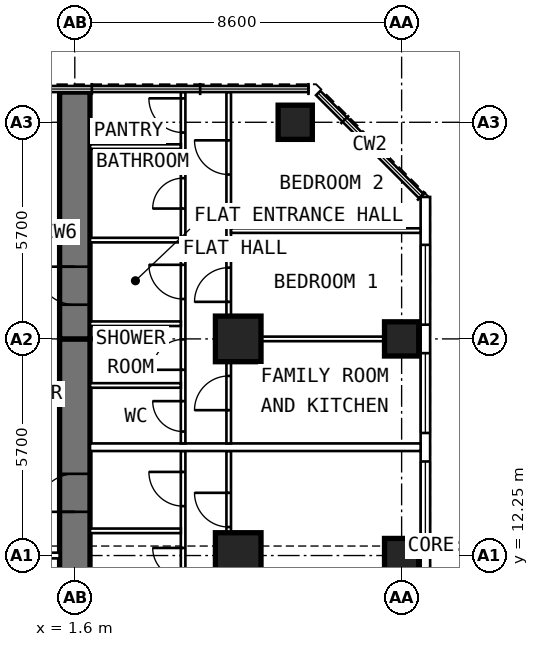
"""IFC4 building model, lengths in metres.
Left out: names, types, materials, properties, quantities, classifications, styles, units other than length and angle.
Written with IfcOpenShell. Run it as: python <this file> out.ifc"""

import sys

from ifc_helpers import new_model, si_unit, direction, frame, frame_2d, origin, origin_2d, place, context, subcontext, project, spatial, rectangle, extrude, element, fill, save


model = new_model("IFC4")
c1 = context("Model", 3, precision=1e-05, world=origin(), true_north=direction((0.0, 1.0)))
c2 = subcontext(c1, "Body", "Model", "MODEL_VIEW")
j1 = project(units=[si_unit("LENGTHUNIT", "METRE"), si_unit("PLANEANGLEUNIT", "RADIAN")], contexts=[c1])
p1 = place(None, origin())
s1 = spatial("IfcSite", under=j1, at=p1, CompositionType="ELEMENT")
p2 = place(p1, origin())
s2 = spatial("IfcBuilding", under=s1, at=p2, CompositionType="ELEMENT")
p3 = place(p2, frame((0.0, 0.0, 168.8)))
s3 = spatial("IfcBuildingStorey", under=s2, at=p3, CompositionType="ELEMENT", Elevation=168.8)
for number, where, z_axis, x_axis in (
    (1, (10.2, 12.25, 0.0), (0.0, 0.0, 1.0), (0.0, 1.0, 0.0)),
    (2, (10.2, 17.95, 0.0), (0.0, 0.0, 1.0), (0.0, 1.0, 0.0)),
    (3, (7.4, 23.65, 0.0), (0.0, 0.0, 1.0), (0.0, 1.0, 0.0)),
):
    element("IfcColumn", number, at=place(p3, frame(where, z_axis=z_axis, x_axis=x_axis)), inside=s3, PredefinedType="COLUMN", context=c2, shape_type="SweptSolid", body=[
        extrude(rectangle(XDim=0.9, YDim=0.9, at=origin_2d()), origin(), (0.0, 0.0, 1.0), 3.6),
    ])
for number, where, z_axis, x_axis in (
    (4, (5.9, 12.25, 0.0), (0.0, 0.0, 1.0), (0.0, 1.0, 0.0)),
    (5, (5.9, 17.95, 0.0), (0.0, 0.0, 1.0), (0.0, 1.0, 0.0)),
):
    element("IfcColumn", number, at=place(p3, frame(where, z_axis=z_axis, x_axis=x_axis)), inside=s3, PredefinedType="COLUMN", context=c2, shape_type="SweptSolid", body=[
        extrude(rectangle(XDim=1.2, YDim=1.2, at=origin_2d()), origin(), (0.0, 0.0, 1.0), 3.6),
    ])
p4 = place(p3, frame((1.6, 9.6, 0.0), z_axis=(0.0, 0.0, 1.0), x_axis=(0.0, 1.0, 0.0)))
e6 = element("IfcWall", 6, at=p4, inside=s3, PredefinedType="SHEAR", context=c2, shape_type="SweptSolid", body=[
    extrude(rectangle(XDim=8.35, YDim=0.8, at=frame_2d((4.175, 0.0))), origin(), (0.0, 0.0, 1.0), 3.6),
])
p5 = place(p4, frame((3.8, 0.0, 0.0)))
e7 = element("IfcOpeningElement", 7, at=p5, cuts=e6, PredefinedType="OPENING", context=c2, shape_type="SweptSolid", body=[
    extrude(rectangle(XDim=1.0, YDim=2.1, at=frame_2d((0.5, 1.05))), frame((0.0, 0.412, 0.0), z_axis=(0.0, -1.0, 0.0), x_axis=(1.0, 0.0, 0.0)), (0.0, 0.0, 1.0), 0.824),
])
p6 = place(p3, frame((1.6, 17.95, 0.0), z_axis=(0.0, 0.0, 1.0), x_axis=(0.0, 1.0, 0.0)))
e8 = element("IfcWall", 8, at=p6, inside=s3, PredefinedType="SHEAR", context=c2, shape_type="SweptSolid", body=[
    extrude(rectangle(XDim=6.495, YDim=0.8, at=frame_2d((3.248, 0.0))), origin(), (0.0, 0.0, 1.0), 3.6),
])
p7 = place(p6, frame((0.9, 0.0, 0.0)))
e9 = element("IfcOpeningElement", 9, at=p7, cuts=e8, PredefinedType="OPENING", context=c2, shape_type="SweptSolid", body=[
    extrude(rectangle(XDim=1.0, YDim=2.1, at=frame_2d((0.5, 1.05))), frame((0.0, 0.412, 0.0), z_axis=(0.0, -1.0, 0.0), x_axis=(1.0, 0.0, 0.0)), (0.0, 0.0, 1.0), 0.824),
])
p8 = place(p3, frame((10.825, 6.409, 0.0), z_axis=(0.0, 0.0, 1.0), x_axis=(0.0, 1.0, 0.0)))
e10 = element("IfcWall", 10, at=p8, inside=s3, PredefinedType="SOLIDWALL", context=c2, shape_type="SweptSolid", body=[
    extrude(rectangle(XDim=15.276, YDim=0.25, at=frame_2d((7.638, 0.0))), origin(), (0.0, 0.0, 1.0), 3.35),
])
p9 = place(p8, frame((0.516, 0.0, 0.8)))
e11 = element("IfcOpeningElement", 11, at=p9, cuts=e10, PredefinedType="OPENING", context=c2, shape_type="SweptSolid", body=[
    extrude(rectangle(XDim=2.1, YDim=1.8, at=frame_2d((1.05, 0.9))), frame((0.0, 0.137, 0.0), z_axis=(0.0, -1.0, 0.0), x_axis=(1.0, 0.0, 0.0)), (0.0, 0.0, 1.0), 0.274),
])
p10 = place(p8, frame((3.366, 0.0, 0.8)))
e12 = element("IfcOpeningElement", 12, at=p10, cuts=e10, PredefinedType="OPENING", context=c2, shape_type="SweptSolid", body=[
    extrude(rectangle(XDim=2.1, YDim=1.8, at=frame_2d((1.05, 0.9))), frame((0.0, 0.137, 0.0), z_axis=(0.0, -1.0, 0.0), x_axis=(1.0, 0.0, 0.0)), (0.0, 0.0, 1.0), 0.274),
])
p11 = place(p8, frame((6.216, 0.0, 0.8)))
e13 = element("IfcOpeningElement", 13, at=p11, cuts=e10, PredefinedType="OPENING", context=c2, shape_type="SweptSolid", body=[
    extrude(rectangle(XDim=2.1, YDim=1.8, at=frame_2d((1.05, 0.9))), frame((0.0, 0.137, 0.0), z_axis=(0.0, -1.0, 0.0), x_axis=(1.0, 0.0, 0.0)), (0.0, 0.0, 1.0), 0.274),
])
p12 = place(p8, frame((9.066, 0.0, 0.8)))
e14 = element("IfcOpeningElement", 14, at=p12, cuts=e10, PredefinedType="OPENING", context=c2, shape_type="SweptSolid", body=[
    extrude(rectangle(XDim=2.1, YDim=1.8, at=frame_2d((1.05, 0.9))), frame((0.0, 0.137, 0.0), z_axis=(0.0, -1.0, 0.0), x_axis=(1.0, 0.0, 0.0)), (0.0, 0.0, 1.0), 0.274),
])
p13 = place(p8, frame((11.916, 0.0, 0.8)))
e15 = element("IfcOpeningElement", 15, at=p13, cuts=e10, PredefinedType="OPENING", context=c2, shape_type="SweptSolid", body=[
    extrude(rectangle(XDim=2.1, YDim=1.8, at=frame_2d((1.05, 0.9))), frame((0.0, 0.137, 0.0), z_axis=(0.0, -1.0, 0.0), x_axis=(1.0, 0.0, 0.0)), (0.0, 0.0, 1.0), 0.274),
])
p14 = place(p3, frame((4.45, 10.05, 0.0), z_axis=(0.0, 0.0, 1.0), x_axis=(0.0, 1.0, 0.0)))
e16 = element("IfcWall", 16, at=p14, inside=s3, PredefinedType="PARTITIONING", context=c2, shape_type="SweptSolid", body=[
    extrude(rectangle(XDim=4.95, YDim=0.12, at=frame_2d((2.475, 0.0))), origin(), (0.0, 0.0, 1.0), 3.35),
])
p15 = place(p14, frame((1.6, 0.0, 0.0)))
e17 = element("IfcOpeningElement", 17, at=p15, cuts=e16, PredefinedType="OPENING", context=c2, shape_type="SweptSolid", body=[
    extrude(rectangle(XDim=0.8, YDim=2.1, at=frame_2d((0.4, 1.05))), frame((0.0, 0.072, 0.0), z_axis=(0.0, -1.0, 0.0), x_axis=(1.0, 0.0, 0.0)), (0.0, 0.0, 1.0), 0.144),
])
p16 = place(p14, frame((3.5, 0.0, 0.0)))
e18 = element("IfcOpeningElement", 18, at=p16, cuts=e16, PredefinedType="OPENING", context=c2, shape_type="SweptSolid", body=[
    extrude(rectangle(XDim=0.9, YDim=2.1, at=frame_2d((0.45, 1.05))), frame((0.0, 0.072, 0.0), z_axis=(0.0, -1.0, 0.0), x_axis=(1.0, 0.0, 0.0)), (0.0, 0.0, 1.0), 0.144),
])
p17 = place(p3, frame((5.65, 9.6, 0.0), z_axis=(0.0, 0.0, 1.0), x_axis=(0.0, 1.0, 0.0)))
e19 = element("IfcWall", 19, at=p17, inside=s3, PredefinedType="PARTITIONING", context=c2, shape_type="SweptSolid", body=[
    extrude(rectangle(XDim=5.4, YDim=0.12, at=frame_2d((2.7, 0.0))), origin(), (0.0, 0.0, 1.0), 3.35),
])
p18 = place(p17, frame((3.4, 0.0, 0.0)))
e20 = element("IfcOpeningElement", 20, at=p18, cuts=e19, PredefinedType="OPENING", context=c2, shape_type="SweptSolid", body=[
    extrude(rectangle(XDim=0.9, YDim=2.1, at=frame_2d((0.45, 1.05))), frame((0.0, 0.072, 0.0), z_axis=(0.0, -1.0, 0.0), x_axis=(1.0, 0.0, 0.0)), (0.0, 0.0, 1.0), 0.144),
])
p19 = place(p3, frame((2.0, 12.9, 0.0), z_axis=(0.0, 0.0, 1.0), x_axis=(1.0, 0.0, 0.0)))
e21 = element("IfcWall", 21, at=p19, inside=s3, PredefinedType="PARTITIONING", context=c2, shape_type="SweptSolid", body=[
    extrude(rectangle(XDim=2.39, YDim=0.12, at=frame_2d((1.195, 0.0))), origin(), (0.0, 0.0, 1.0), 3.35),
])
p20 = place(p3, frame((4.45, 15.2, 0.0), z_axis=(0.0, 0.0, 1.0), x_axis=(0.0, 1.0, 0.0)))
e22 = element("IfcWall", 22, at=p20, inside=s3, PredefinedType="PARTITIONING", context=c2, shape_type="SweptSolid", body=[
    extrude(rectangle(XDim=9.245, YDim=0.12, at=frame_2d((4.623, 0.0))), origin(), (0.0, 0.0, 1.0), 3.35),
])
p21 = place(p20, frame((0.312, 0.0, 0.0)))
e23 = element("IfcOpeningElement", 23, at=p21, cuts=e22, PredefinedType="OPENING", context=c2, shape_type="SweptSolid", body=[
    extrude(rectangle(XDim=0.8, YDim=2.1, at=frame_2d((0.4, 1.05))), frame((0.0, 0.072, 0.0), z_axis=(0.0, -1.0, 0.0), x_axis=(1.0, 0.0, 0.0)), (0.0, 0.0, 1.0), 0.144),
])
p22 = place(p20, frame((1.938, 0.0, 0.0)))
e24 = element("IfcOpeningElement", 24, at=p22, cuts=e22, PredefinedType="OPENING", context=c2, shape_type="SweptSolid", body=[
    extrude(rectangle(XDim=0.8, YDim=2.1, at=frame_2d((0.4, 1.05))), frame((0.0, 0.072, 0.0), z_axis=(0.0, -1.0, 0.0), x_axis=(1.0, 0.0, 0.0)), (0.0, 0.0, 1.0), 0.144),
])
p23 = place(p20, frame((3.8, 0.0, 0.0)))
e25 = element("IfcOpeningElement", 25, at=p23, cuts=e22, PredefinedType="OPENING", context=c2, shape_type="SweptSolid", body=[
    extrude(rectangle(XDim=0.9, YDim=2.1, at=frame_2d((0.45, 1.05))), frame((0.0, 0.072, 0.0), z_axis=(0.0, -1.0, 0.0), x_axis=(1.0, 0.0, 0.0)), (0.0, 0.0, 1.0), 0.144),
])
p24 = place(p20, frame((6.18, 0.0, 0.0)))
e26 = element("IfcOpeningElement", 26, at=p24, cuts=e22, PredefinedType="OPENING", context=c2, shape_type="SweptSolid", body=[
    extrude(rectangle(XDim=0.8, YDim=2.1, at=frame_2d((0.4, 1.05))), frame((0.0, 0.072, 0.0), z_axis=(0.0, -1.0, 0.0), x_axis=(1.0, 0.0, 0.0)), (0.0, 0.0, 1.0), 0.144),
])
p25 = place(p20, frame((8.18, 0.0, 0.0)))
e27 = element("IfcOpeningElement", 27, at=p25, cuts=e22, PredefinedType="OPENING", context=c2, shape_type="SweptSolid", body=[
    extrude(rectangle(XDim=0.9, YDim=2.1, at=frame_2d((0.45, 1.05))), frame((0.0, 0.072, 0.0), z_axis=(0.0, -1.0, 0.0), x_axis=(1.0, 0.0, 0.0)), (0.0, 0.0, 1.0), 0.144),
])
p26 = place(p3, frame((5.65, 15.2, 0.0), z_axis=(0.0, 0.0, 1.0), x_axis=(0.0, 1.0, 0.0)))
e28 = element("IfcWall", 28, at=p26, inside=s3, PredefinedType="PARTITIONING", context=c2, shape_type="SweptSolid", body=[
    extrude(rectangle(XDim=9.245, YDim=0.12, at=frame_2d((4.623, 0.0))), origin(), (0.0, 0.0, 1.0), 3.35),
])
p27 = place(p26, frame((0.875, 0.0, 0.0)))
e29 = element("IfcOpeningElement", 29, at=p27, cuts=e28, PredefinedType="OPENING", context=c2, shape_type="SweptSolid", body=[
    extrude(rectangle(XDim=0.9, YDim=2.1, at=frame_2d((0.45, 1.05))), frame((0.0, 0.072, 0.0), z_axis=(0.0, -1.0, 0.0), x_axis=(1.0, 0.0, 0.0)), (0.0, 0.0, 1.0), 0.144),
])
p28 = place(p26, frame((3.725, 0.0, 0.0)))
e30 = element("IfcOpeningElement", 30, at=p28, cuts=e28, PredefinedType="OPENING", context=c2, shape_type="SweptSolid", body=[
    extrude(rectangle(XDim=0.9, YDim=2.1, at=frame_2d((0.45, 1.05))), frame((0.0, 0.072, 0.0), z_axis=(0.0, -1.0, 0.0), x_axis=(1.0, 0.0, 0.0)), (0.0, 0.0, 1.0), 0.144),
])
p29 = place(p26, frame((7.075, 0.0, 0.0)))
e31 = element("IfcOpeningElement", 31, at=p29, cuts=e28, PredefinedType="OPENING", context=c2, shape_type="SweptSolid", body=[
    extrude(rectangle(XDim=0.9, YDim=2.1, at=frame_2d((0.45, 1.05))), frame((0.0, 0.072, 0.0), z_axis=(0.0, -1.0, 0.0), x_axis=(1.0, 0.0, 0.0)), (0.0, 0.0, 1.0), 0.144),
])
p30 = place(p3, frame((5.71, 17.95, 0.0), z_axis=(0.0, 0.0, 1.0), x_axis=(1.0, 0.0, 0.0)))
e32 = element("IfcWall", 32, at=p30, inside=s3, PredefinedType="PARTITIONING", context=c2, shape_type="SweptSolid", body=[
    extrude(rectangle(XDim=4.99, YDim=0.12, at=frame_2d((2.495, 0.0))), origin(), (0.0, 0.0, 1.0), 2.45),
])
p31 = place(p3, frame((5.71, 20.8, 0.0), z_axis=(0.0, 0.0, 1.0), x_axis=(1.0, 0.0, 0.0)))
e33 = element("IfcWall", 33, at=p31, inside=s3, PredefinedType="PARTITIONING", context=c2, shape_type="SweptSolid", body=[
    extrude(rectangle(XDim=4.99, YDim=0.12, at=frame_2d((2.495, 0.0))), origin(), (0.0, 0.0, 1.0), 3.35),
])
for number, where, z_axis, x_axis in (
    (34, (2.0, 16.725, 0.0), (0.0, 0.0, 1.0), (1.0, 0.0, 0.0)),
    (35, (2.0, 18.35, 0.0), (0.0, 0.0, 1.0), (1.0, 0.0, 0.0)),
    (36, (2.0, 20.55, 0.0), (0.0, 0.0, 1.0), (1.0, 0.0, 0.0)),
    (37, (2.0, 23.01, 0.0), (0.0, 0.0, 1.0), (1.0, 0.0, 0.0)),
):
    element("IfcWall", number, at=place(p3, frame(where, z_axis=z_axis, x_axis=x_axis)), inside=s3, PredefinedType="PARTITIONING", context=c2, shape_type="SweptSolid", body=[
        extrude(rectangle(XDim=2.39, YDim=0.12, at=frame_2d((1.195, 0.0))), origin(), (0.0, 0.0, 1.0), 3.35),
    ])
p32 = place(p3, frame((2.0, 15.1, 0.0), z_axis=(0.0, 0.0, 1.0), x_axis=(1.0, 0.0, 0.0)))
e38 = element("IfcWall", 38, at=p32, inside=s3, PredefinedType="PARTITIONING", context=c2, shape_type="SweptSolid", body=[
    extrude(rectangle(XDim=8.7, YDim=0.2, at=frame_2d((4.35, 0.0))), origin(), (0.0, 0.0, 1.0), 3.35),
])
p33 = place(p3, frame((1.2, 20.75, 0.0), z_axis=(0.0, 0.0, 1.0), x_axis=(-1.0, 0.0, 0.0)))
e39 = element("IfcWall", 39, at=p33, inside=s3, PredefinedType="PARTITIONING", context=c2, shape_type="SweptSolid", body=[
    extrude(rectangle(XDim=2.4, YDim=0.15, at=frame_2d((1.2, 0.0))), origin(), (0.0, 0.0, 1.0), 3.35),
])
p34 = place(p33, frame((0.7, 0.0, 0.0)))
e40 = element("IfcOpeningElement", 40, at=p34, cuts=e39, PredefinedType="OPENING", context=c2, shape_type="SweptSolid", body=[
    extrude(rectangle(XDim=1.0, YDim=2.1, at=frame_2d((0.5, 1.05))), frame((0.0, 0.087, 0.0), z_axis=(0.0, -1.0, 0.0), x_axis=(1.0, 0.0, 0.0)), (0.0, 0.0, 1.0), 0.174),
])
p35 = place(p3, frame((1.2, 12.25, 0.0), z_axis=(0.0, 0.0, 1.0), x_axis=(-1.0, 0.0, 0.0)))
e41 = element("IfcWall", 41, at=p35, inside=s3, PredefinedType="PARTITIONING", context=c2, shape_type="SweptSolid", body=[
    extrude(rectangle(XDim=2.4, YDim=0.15, at=frame_2d((1.2, 0.0))), origin(), (0.0, 0.0, 1.0), 3.35),
])
p36 = place(p35, frame((0.7, 0.0, 0.0)))
e42 = element("IfcOpeningElement", 42, at=p36, cuts=e41, PredefinedType="OPENING", context=c2, shape_type="SweptSolid", body=[
    extrude(rectangle(XDim=1.0, YDim=2.1, at=frame_2d((0.5, 1.05))), frame((0.0, 0.087, 0.0), z_axis=(0.0, -1.0, 0.0), x_axis=(1.0, 0.0, 0.0)), (0.0, 0.0, 1.0), 0.174),
])
p37 = place(p11, origin())
e43 = element("IfcWindow", 43, at=p37, inside=s3, PartitioningType="SINGLE_PANEL", PredefinedType="WINDOW", context=c2, shape_type="SweptSolid", body=[
    extrude(rectangle(XDim=2.1, YDim=1.8, at=frame_2d((1.05, 0.9))), frame((0.0, 0.03, 0.0), z_axis=(0.0, -1.0, 0.0), x_axis=(1.0, 0.0, 0.0)), (0.0, 0.0, 1.0), 0.06),
])
fill(e13, e43)
p38 = place(p12, origin())
e44 = element("IfcWindow", 44, at=p38, inside=s3, PartitioningType="SINGLE_PANEL", PredefinedType="WINDOW", context=c2, shape_type="SweptSolid", body=[
    extrude(rectangle(XDim=2.1, YDim=1.8, at=frame_2d((1.05, 0.9))), frame((0.0, 0.03, 0.0), z_axis=(0.0, -1.0, 0.0), x_axis=(1.0, 0.0, 0.0)), (0.0, 0.0, 1.0), 0.06),
])
fill(e14, e44)
p39 = place(p13, origin())
e45 = element("IfcWindow", 45, at=p39, inside=s3, PartitioningType="SINGLE_PANEL", PredefinedType="WINDOW", context=c2, shape_type="SweptSolid", body=[
    extrude(rectangle(XDim=2.1, YDim=1.8, at=frame_2d((1.05, 0.9))), frame((0.0, 0.03, 0.0), z_axis=(0.0, -1.0, 0.0), x_axis=(1.0, 0.0, 0.0)), (0.0, 0.0, 1.0), 0.06),
])
fill(e15, e45)
p40 = place(p5, origin())
e46 = element("IfcDoor", 46, at=p40, inside=s3, OperationType="SINGLE_SWING_LEFT", PredefinedType="DOOR", context=c2, shape_type="SweptSolid", body=[
    extrude(rectangle(XDim=1.0, YDim=2.1, at=frame_2d((0.5, 1.05))), frame((0.0, 0.15, 0.0), z_axis=(0.0, -1.0, 0.0), x_axis=(1.0, 0.0, 0.0)), (0.0, 0.0, 1.0), 0.3),
])
fill(e7, e46)
p41 = place(p18, origin())
e47 = element("IfcDoor", 47, at=p41, inside=s3, OperationType="SINGLE_SWING_RIGHT", PredefinedType="DOOR", context=c2, shape_type="SweptSolid", body=[
    extrude(rectangle(XDim=0.9, YDim=2.1, at=frame_2d((0.45, 1.05))), frame((0.0, 0.025, 0.0), z_axis=(0.0, -1.0, 0.0), x_axis=(1.0, 0.0, 0.0)), (0.0, 0.0, 1.0), 0.05),
])
fill(e20, e47)
p42 = place(p15, origin())
e48 = element("IfcDoor", 48, at=p42, inside=s3, OperationType="SINGLE_SWING_RIGHT", PredefinedType="DOOR", context=c2, shape_type="SweptSolid", body=[
    extrude(rectangle(XDim=0.8, YDim=2.1, at=frame_2d((0.4, 1.05))), frame((0.0, 0.025, 0.0), z_axis=(0.0, -1.0, 0.0), x_axis=(1.0, 0.0, 0.0)), (0.0, 0.0, 1.0), 0.05),
])
fill(e17, e48)
p43 = place(p16, origin())
e49 = element("IfcDoor", 49, at=p43, inside=s3, OperationType="SINGLE_SWING_RIGHT", PredefinedType="DOOR", context=c2, shape_type="SweptSolid", body=[
    extrude(rectangle(XDim=0.9, YDim=2.1, at=frame_2d((0.45, 1.05))), frame((0.0, 0.025, 0.0), z_axis=(0.0, -1.0, 0.0), x_axis=(1.0, 0.0, 0.0)), (0.0, 0.0, 1.0), 0.05),
])
fill(e18, e49)
p44 = place(p7, origin())
e50 = element("IfcDoor", 50, at=p44, inside=s3, OperationType="SINGLE_SWING_RIGHT", PredefinedType="DOOR", context=c2, shape_type="SweptSolid", body=[
    extrude(rectangle(XDim=1.0, YDim=2.1, at=frame_2d((0.5, 1.05))), frame((0.0, 0.15, 0.0), z_axis=(0.0, -1.0, 0.0), x_axis=(1.0, 0.0, 0.0)), (0.0, 0.0, 1.0), 0.3),
])
fill(e9, e50)
p45 = place(p27, origin())
e51 = element("IfcDoor", 51, at=p45, inside=s3, OperationType="SINGLE_SWING_LEFT", PredefinedType="DOOR", context=c2, shape_type="SweptSolid", body=[
    extrude(rectangle(XDim=0.9, YDim=2.1, at=frame_2d((0.45, 1.05))), frame((0.0, 0.025, 0.0), z_axis=(0.0, -1.0, 0.0), x_axis=(1.0, 0.0, 0.0)), (0.0, 0.0, 1.0), 0.05),
])
fill(e29, e51)
p46 = place(p28, origin())
e52 = element("IfcDoor", 52, at=p46, inside=s3, OperationType="SINGLE_SWING_LEFT", PredefinedType="DOOR", context=c2, shape_type="SweptSolid", body=[
    extrude(rectangle(XDim=0.9, YDim=2.1, at=frame_2d((0.45, 1.05))), frame((0.0, 0.025, 0.0), z_axis=(0.0, -1.0, 0.0), x_axis=(1.0, 0.0, 0.0)), (0.0, 0.0, 1.0), 0.05),
])
fill(e30, e52)
p47 = place(p29, origin())
e53 = element("IfcDoor", 53, at=p47, inside=s3, OperationType="SINGLE_SWING_RIGHT", PredefinedType="DOOR", context=c2, shape_type="SweptSolid", body=[
    extrude(rectangle(XDim=0.9, YDim=2.1, at=frame_2d((0.45, 1.05))), frame((0.0, 0.025, 0.0), z_axis=(0.0, -1.0, 0.0), x_axis=(1.0, 0.0, 0.0)), (0.0, 0.0, 1.0), 0.05),
])
fill(e31, e53)
p48 = place(p21, origin())
e54 = element("IfcDoor", 54, at=p48, inside=s3, OperationType="SINGLE_SWING_RIGHT", PredefinedType="DOOR", context=c2, shape_type="SweptSolid", body=[
    extrude(rectangle(XDim=0.8, YDim=2.1, at=frame_2d((0.4, 1.05))), frame((0.0, 0.025, 0.0), z_axis=(0.0, -1.0, 0.0), x_axis=(1.0, 0.0, 0.0)), (0.0, 0.0, 1.0), 0.05),
])
fill(e23, e54)
p49 = place(p22, origin())
e55 = element("IfcDoor", 55, at=p49, inside=s3, OperationType="SINGLE_SWING_LEFT", PredefinedType="DOOR", context=c2, shape_type="SweptSolid", body=[
    extrude(rectangle(XDim=0.8, YDim=2.1, at=frame_2d((0.4, 1.05))), frame((0.0, 0.025, 0.0), z_axis=(0.0, -1.0, 0.0), x_axis=(1.0, 0.0, 0.0)), (0.0, 0.0, 1.0), 0.05),
])
fill(e24, e55)
p50 = place(p23, origin())
e56 = element("IfcDoor", 56, at=p50, inside=s3, OperationType="SINGLE_SWING_RIGHT", PredefinedType="DOOR", context=c2, shape_type="SweptSolid", body=[
    extrude(rectangle(XDim=0.9, YDim=2.1, at=frame_2d((0.45, 1.05))), frame((0.0, 0.025, 0.0), z_axis=(0.0, -1.0, 0.0), x_axis=(1.0, 0.0, 0.0)), (0.0, 0.0, 1.0), 0.05),
])
fill(e25, e56)
p51 = place(p24, origin())
e57 = element("IfcDoor", 57, at=p51, inside=s3, OperationType="SINGLE_SWING_LEFT", PredefinedType="DOOR", context=c2, shape_type="SweptSolid", body=[
    extrude(rectangle(XDim=0.8, YDim=2.1, at=frame_2d((0.4, 1.05))), frame((0.0, 0.025, 0.0), z_axis=(0.0, -1.0, 0.0), x_axis=(1.0, 0.0, 0.0)), (0.0, 0.0, 1.0), 0.05),
])
fill(e26, e57)
p52 = place(p25, origin())
e58 = element("IfcDoor", 58, at=p52, inside=s3, OperationType="SINGLE_SWING_RIGHT", PredefinedType="DOOR", context=c2, shape_type="SweptSolid", body=[
    extrude(rectangle(XDim=0.9, YDim=2.1, at=frame_2d((0.45, 1.05))), frame((0.0, 0.025, 0.0), z_axis=(0.0, -1.0, 0.0), x_axis=(1.0, 0.0, 0.0)), (0.0, 0.0, 1.0), 0.05),
])
fill(e27, e58)
save(model, sys.argv[1])
